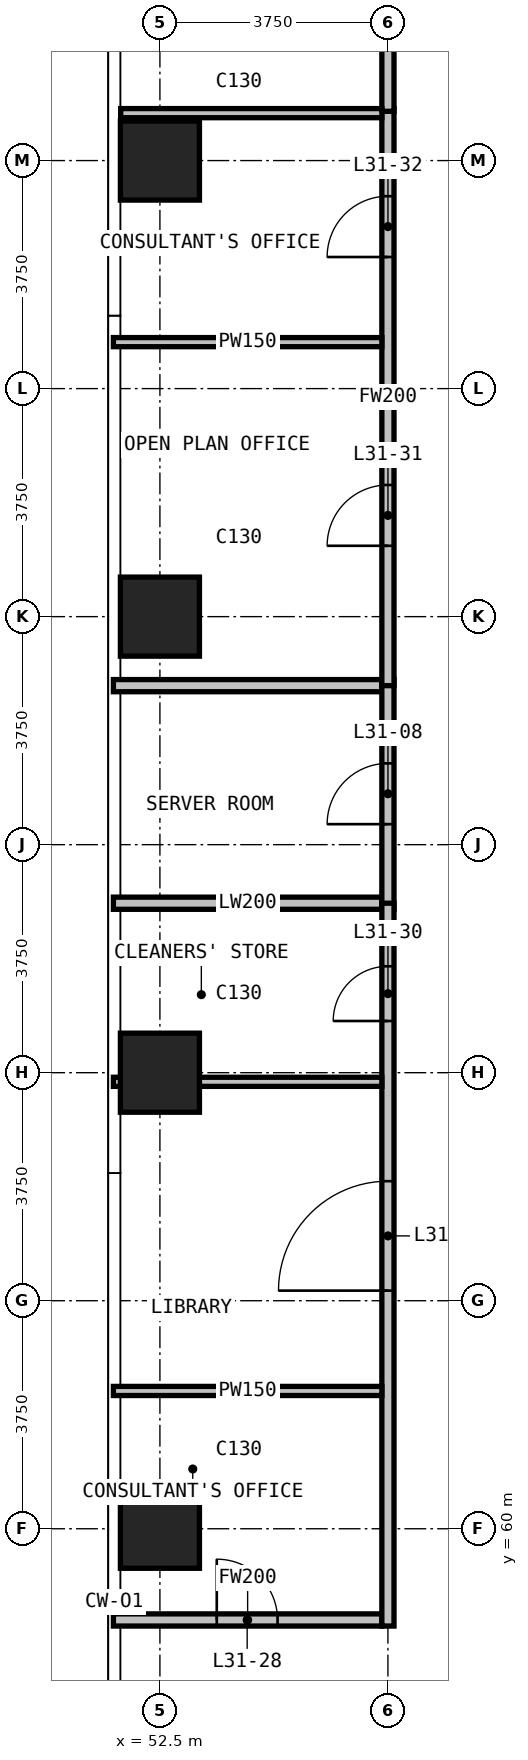
"""IFC4 building model, lengths in metres.
Left out: names, types, materials, properties, quantities, classifications, styles, units other than length and angle.
Written with IfcOpenShell. Run it as: python <this file> out.ifc"""

import sys

from ifc_helpers import new_model, si_unit, direction, frame, frame_2d, origin, origin_2d, place, context, subcontext, project, spatial, rectangle, extrude, element, fill, save


model = new_model("IFC4")
c1 = context("Model", 3, precision=1e-05, world=origin(), true_north=direction((0.0, 1.0)))
c2 = subcontext(c1, "Body", "Model", "MODEL_VIEW")
j1 = project(units=[si_unit("LENGTHUNIT", "METRE"), si_unit("PLANEANGLEUNIT", "RADIAN")], contexts=[c1])
p1 = place(None, origin())
s1 = spatial("IfcSite", under=j1, at=p1, CompositionType="ELEMENT")
p2 = place(p1, origin())
s2 = spatial("IfcBuilding", under=s1, at=p2, CompositionType="ELEMENT")
p3 = place(p2, frame((0.0, 0.0, 125.2)))
s3 = spatial("IfcBuildingStorey", under=s2, at=p3, CompositionType="ELEMENT", Elevation=125.2)
for number, where, z_axis, x_axis in (
    (1, (52.5, 60.0, 0.0), (0.0, 0.0, 1.0), (1.0, 0.0, 0.0)),
    (2, (52.5, 67.5, 0.0), (0.0, 0.0, 1.0), (1.0, 0.0, 0.0)),
    (3, (52.5, 75.0, 0.0), (0.0, 0.0, 1.0), (1.0, 0.0, 0.0)),
    (4, (52.5, 82.5, 0.0), (0.0, 0.0, 1.0), (1.0, 0.0, 0.0)),
):
    element("IfcColumn", number, at=place(p3, frame(where, z_axis=z_axis, x_axis=x_axis)), inside=s3, PredefinedType="COLUMN", context=c2, shape_type="SweptSolid", body=[
        extrude(rectangle(XDim=1.3, YDim=1.3, at=origin_2d()), origin(), (0.0, 0.0, 1.0), 3.6),
    ])
for number, where, z_axis, x_axis in (
    (5, (51.735, 70.287, 0.0), (0.0, 0.0, 1.0), (1.0, 0.0, 0.0)),
    (6, (51.735, 73.865, 0.0), (0.0, 0.0, 1.0), (1.0, 0.0, 0.0)),
):
    element("IfcWall", number, at=place(p3, frame(where, z_axis=z_axis, x_axis=x_axis)), inside=s3, PredefinedType="PARTITIONING", context=c2, shape_type="SweptSolid", body=[
        extrude(rectangle(XDim=4.415, YDim=0.2, at=frame_2d((2.208, 0.0))), origin(), (0.0, 0.0, 1.0), 3.3),
    ])
p4 = place(p3, frame((56.25, 70.187, 0.0), z_axis=(0.0, 0.0, 1.0), x_axis=(0.0, 1.0, 0.0)))
e7 = element("IfcWall", 7, at=p4, inside=s3, PredefinedType="PARTITIONING", context=c2, shape_type="SweptSolid", body=[
    extrude(rectangle(XDim=3.778, YDim=0.2, at=frame_2d((1.889, 0.0))), origin(), (0.0, 0.0, 1.0), 3.3),
])
p5 = place(p4, frame((1.4, 0.0, 0.0)))
e8 = element("IfcOpeningElement", 8, at=p5, cuts=e7, PredefinedType="OPENING", context=c2, shape_type="SweptSolid", body=[
    extrude(rectangle(XDim=1.0, YDim=2.2, at=frame_2d((0.5, 1.1))), frame((0.0, 0.11, 0.0), z_axis=(0.0, -1.0, 0.0), x_axis=(1.0, 0.0, 0.0)), (0.0, 0.0, 1.0), 0.22),
])
p6 = place(p3, frame((51.735, 58.5, 0.0), z_axis=(0.0, 0.0, 1.0), x_axis=(1.0, 0.0, 0.0)))
e9 = element("IfcWall", 9, at=p6, inside=s3, PredefinedType="PARTITIONING", context=c2, shape_type="SweptSolid", body=[
    extrude(rectangle(XDim=4.415, YDim=0.2, at=frame_2d((2.208, 0.0))), origin(), (0.0, 0.0, 1.0), 3.3),
])
p7 = place(p6, frame((1.7, 0.0, 0.0)))
e10 = element("IfcOpeningElement", 10, at=p7, cuts=e9, PredefinedType="OPENING", context=c2, shape_type="SweptSolid", body=[
    extrude(rectangle(XDim=1.0, YDim=2.2, at=frame_2d((0.5, 1.1))), frame((0.0, 0.11, 0.0), z_axis=(0.0, -1.0, 0.0), x_axis=(1.0, 0.0, 0.0)), (0.0, 0.0, 1.0), 0.22),
])
p8 = place(p3, frame((56.25, 58.4, 0.0), z_axis=(0.0, 0.0, 1.0), x_axis=(0.0, 1.0, 0.0)))
e11 = element("IfcWall", 11, at=p8, inside=s3, PredefinedType="PARTITIONING", context=c2, shape_type="SweptSolid", body=[
    extrude(rectangle(XDim=11.887, YDim=0.2, at=frame_2d((5.944, 0.0))), origin(), (0.0, 0.0, 1.0), 3.3),
])
p9 = place(p8, frame((5.516, 0.0, 0.0)))
e12 = element("IfcOpeningElement", 12, at=p9, cuts=e11, PredefinedType="OPENING", context=c2, shape_type="SweptSolid", body=[
    extrude(rectangle(XDim=1.8, YDim=2.2, at=frame_2d((0.9, 1.1))), frame((0.0, 0.11, 0.0), z_axis=(0.0, -1.0, 0.0), x_axis=(1.0, 0.0, 0.0)), (0.0, 0.0, 1.0), 0.22),
])
p10 = place(p8, frame((9.95, 0.0, 0.0)))
e13 = element("IfcOpeningElement", 13, at=p10, cuts=e11, PredefinedType="OPENING", context=c2, shape_type="SweptSolid", body=[
    extrude(rectangle(XDim=0.9, YDim=2.2, at=frame_2d((0.45, 1.1))), frame((0.0, 0.11, 0.0), z_axis=(0.0, -1.0, 0.0), x_axis=(1.0, 0.0, 0.0)), (0.0, 0.0, 1.0), 0.22),
])
p11 = place(p3, frame((56.25, 73.865, 0.0), z_axis=(0.0, 0.0, 1.0), x_axis=(0.0, 1.0, 0.0)))
e14 = element("IfcWall", 14, at=p11, inside=s3, PredefinedType="PARTITIONING", context=c2, shape_type="SweptSolid", body=[
    extrude(rectangle(XDim=9.49, YDim=0.2, at=frame_2d((4.745, 0.0))), origin(), (0.0, 0.0, 1.0), 3.3),
])
p12 = place(p11, frame((2.3, 0.0, 0.0)))
e15 = element("IfcOpeningElement", 15, at=p12, cuts=e14, PredefinedType="OPENING", context=c2, shape_type="SweptSolid", body=[
    extrude(rectangle(XDim=1.0, YDim=2.2, at=frame_2d((0.5, 1.1))), frame((0.0, 0.11, 0.0), z_axis=(0.0, -1.0, 0.0), x_axis=(1.0, 0.0, 0.0)), (0.0, 0.0, 1.0), 0.22),
])
p13 = place(p11, frame((7.049, 0.0, 0.0)))
e16 = element("IfcOpeningElement", 16, at=p13, cuts=e14, PredefinedType="OPENING", context=c2, shape_type="SweptSolid", body=[
    extrude(rectangle(XDim=1.0, YDim=2.2, at=frame_2d((0.5, 1.1))), frame((0.0, 0.11, 0.0), z_axis=(0.0, -1.0, 0.0), x_axis=(1.0, 0.0, 0.0)), (0.0, 0.0, 1.0), 0.22),
])
p14 = place(p3, frame((56.25, 83.31, 0.0), z_axis=(0.0, 0.0, 1.0), x_axis=(0.0, 1.0, 0.0)))
e17 = element("IfcWall", 17, at=p14, inside=s3, PredefinedType="PARTITIONING", context=c2, shape_type="SweptSolid", body=[
    extrude(rectangle(XDim=7.335, YDim=0.2, at=frame_2d((3.667, 0.0))), origin(), (0.0, 0.0, 1.0), 3.3),
])
for number, where, z_axis, x_axis in (
    (18, (51.735, 62.266, 0.0), (0.0, 0.0, 1.0), (1.0, 0.0, 0.0)),
    (19, (51.735, 67.35, 0.0), (0.0, 0.0, 1.0), (1.0, 0.0, 0.0)),
    (20, (51.735, 79.514, 0.0), (0.0, 0.0, 1.0), (1.0, 0.0, 0.0)),
):
    element("IfcWall", number, at=place(p3, frame(where, z_axis=z_axis, x_axis=x_axis)), inside=s3, PredefinedType="PARTITIONING", context=c2, shape_type="SweptSolid", body=[
        extrude(rectangle(XDim=4.415, YDim=0.15, at=frame_2d((2.208, 0.0))), origin(), (0.0, 0.0, 1.0), 3.3),
    ])
p15 = place(p3, frame((51.855, 83.28, 0.0), z_axis=(0.0, 0.0, 1.0), x_axis=(1.0, 0.0, 0.0)))
e21 = element("IfcWall", 21, at=p15, inside=s3, PredefinedType="PARTITIONING", context=c2, shape_type="SweptSolid", body=[
    extrude(rectangle(XDim=4.295, YDim=0.15, at=frame_2d((2.147, 0.0))), origin(), (0.0, 0.0, 1.0), 3.3),
])
p16 = place(p5, origin())
e22 = element("IfcDoor", 22, at=p16, inside=s3, OperationType="SINGLE_SWING_RIGHT", PredefinedType="DOOR", context=c2, shape_type="SweptSolid", body=[
    extrude(rectangle(XDim=1.0, YDim=2.2, at=frame_2d((0.5, 1.1))), frame((0.0, 0.025, 0.0), z_axis=(0.0, -1.0, 0.0), x_axis=(1.0, 0.0, 0.0)), (0.0, 0.0, 1.0), 0.05),
])
fill(e8, e22)
p17 = place(p7, origin())
e23 = element("IfcDoor", 23, at=p17, inside=s3, OperationType="SINGLE_SWING_RIGHT", PredefinedType="DOOR", context=c2, shape_type="SweptSolid", body=[
    extrude(rectangle(XDim=1.0, YDim=2.2, at=frame_2d((0.5, 1.1))), frame((0.0, 0.025, 0.0), z_axis=(0.0, -1.0, 0.0), x_axis=(1.0, 0.0, 0.0)), (0.0, 0.0, 1.0), 0.05),
])
fill(e10, e23)
p18 = place(p9, origin())
e24 = element("IfcDoor", 24, at=p18, inside=s3, OperationType="DOUBLE_DOOR_SINGLE_SWING", PredefinedType="DOOR", context=c2, shape_type="SweptSolid", body=[
    extrude(rectangle(XDim=1.8, YDim=2.2, at=frame_2d((0.9, 1.1))), frame((0.0, 0.025, 0.0), z_axis=(0.0, -1.0, 0.0), x_axis=(1.0, 0.0, 0.0)), (0.0, 0.0, 1.0), 0.05),
])
fill(e12, e24)
p19 = place(p10, origin())
e25 = element("IfcDoor", 25, at=p19, inside=s3, OperationType="SINGLE_SWING_RIGHT", PredefinedType="DOOR", context=c2, shape_type="SweptSolid", body=[
    extrude(rectangle(XDim=0.9, YDim=2.2, at=frame_2d((0.45, 1.1))), frame((0.0, 0.025, 0.0), z_axis=(0.0, -1.0, 0.0), x_axis=(1.0, 0.0, 0.0)), (0.0, 0.0, 1.0), 0.05),
])
fill(e13, e25)
p20 = place(p12, origin())
e26 = element("IfcDoor", 26, at=p20, inside=s3, OperationType="SINGLE_SWING_LEFT", PredefinedType="DOOR", context=c2, shape_type="SweptSolid", body=[
    extrude(rectangle(XDim=1.0, YDim=2.2, at=frame_2d((0.5, 1.1))), frame((0.0, 0.025, 0.0), z_axis=(0.0, -1.0, 0.0), x_axis=(1.0, 0.0, 0.0)), (0.0, 0.0, 1.0), 0.05),
])
fill(e15, e26)
p21 = place(p13, origin())
e27 = element("IfcDoor", 27, at=p21, inside=s3, OperationType="SINGLE_SWING_RIGHT", PredefinedType="DOOR", context=c2, shape_type="SweptSolid", body=[
    extrude(rectangle(XDim=1.0, YDim=2.2, at=frame_2d((0.5, 1.1))), frame((0.0, 0.025, 0.0), z_axis=(0.0, -1.0, 0.0), x_axis=(1.0, 0.0, 0.0)), (0.0, 0.0, 1.0), 0.05),
])
fill(e16, e27)
save(model, sys.argv[1])
